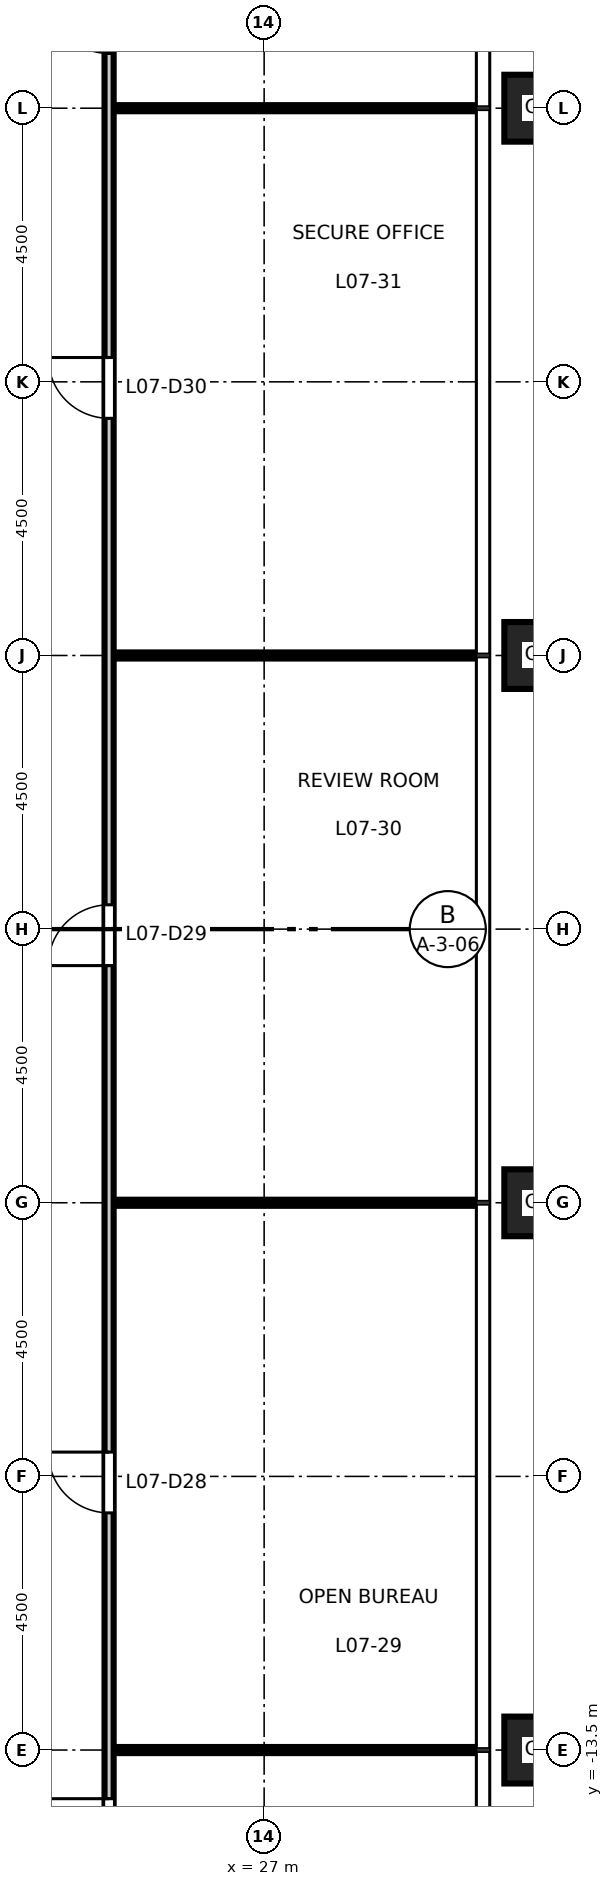
"""IFC4 building model, lengths in metres.
Left out: names, types, materials, properties, quantities, classifications, styles, units other than length and angle.
Written with IfcOpenShell. Run it as: python <this file> out.ifc"""

import sys

from ifc_helpers import new_model, si_unit, direction, frame, frame_2d, origin, origin_2d, place, context, subcontext, project, spatial, rectangle, hollow_rectangle, extrude, element, fill, save


model = new_model("IFC4")
c1 = context("Model", 3, precision=1e-05, world=origin(), true_north=direction((0.0, 1.0)))
c2 = subcontext(c1, "Body", "Model", "MODEL_VIEW")
j1 = project(units=[si_unit("LENGTHUNIT", "METRE"), si_unit("PLANEANGLEUNIT", "RADIAN")], contexts=[c1])
p1 = place(None, origin())
s1 = spatial("IfcSite", under=j1, at=p1, CompositionType="ELEMENT")
p2 = place(p1, origin())
s2 = spatial("IfcBuilding", under=s1, at=p2, CompositionType="ELEMENT")
p3 = place(p2, frame((0.0, 0.0, 35.7)))
s3 = spatial("IfcBuildingStorey", under=s2, at=p3, CompositionType="ELEMENT", Elevation=35.7)
for number, where, z_axis, x_axis in (
    (1, (31.5, -13.5, 0.0), (0.0, 0.0, 1.0), (1.0, 0.0, 0.0)),
    (2, (31.5, -4.5, 0.0), (0.0, 0.0, 1.0), (1.0, 0.0, 0.0)),
    (3, (31.5, 4.5, 0.0), (0.0, 0.0, 1.0), (1.0, 0.0, 0.0)),
    (4, (31.5, 13.5, 0.0), (0.0, 0.0, 1.0), (1.0, 0.0, 0.0)),
):
    element("IfcColumn", number, at=place(p3, frame(where, z_axis=z_axis, x_axis=x_axis)), inside=s3, PredefinedType="COLUMN", context=c2, shape_type="SweptSolid", body=[
        extrude(hollow_rectangle(XDim=1.1, YDim=1.1, WallThickness=0.07, at=origin_2d()), origin(), (0.0, 0.0, 1.0), 4.5),
    ])
p4 = place(p3, frame((24.525, -13.5, 0.0), z_axis=(0.0, 0.0, 1.0), x_axis=(1.0, 0.0, 0.0)))
e5 = element("IfcWall", 5, at=p4, inside=s3, PredefinedType="PARTITIONING", context=c2, shape_type="SweptSolid", body=[
    extrude(rectangle(XDim=5.985, YDim=0.1, at=frame_2d((2.993, 0.0))), origin(), (0.0, 0.0, 1.0), 3.35),
])
for number, where, z_axis, x_axis in (
    (6, (24.525, -4.5, 0.0), (0.0, 0.0, 1.0), (1.0, 0.0, 0.0)),
    (7, (24.525, 4.5, 0.0), (0.0, 0.0, 1.0), (1.0, 0.0, 0.0)),
):
    element("IfcWall", number, at=place(p3, frame(where, z_axis=z_axis, x_axis=x_axis)), inside=s3, PredefinedType="PARTITIONING", context=c2, shape_type="SweptSolid", body=[
        extrude(rectangle(XDim=5.985, YDim=0.1, at=frame_2d((2.993, 0.0))), origin(), (0.0, 0.0, 1.0), 4.35),
    ])
p5 = place(p3, frame((24.525, 13.5, 0.0), z_axis=(0.0, 0.0, 1.0), x_axis=(1.0, 0.0, 0.0)))
e8 = element("IfcWall", 8, at=p5, inside=s3, PredefinedType="PARTITIONING", context=c2, shape_type="SweptSolid", body=[
    extrude(rectangle(XDim=5.985, YDim=0.1, at=frame_2d((2.993, 0.0))), origin(), (0.0, 0.0, 1.0), 3.35),
])
p6 = place(p3, frame((24.45, -16.125, 0.0), z_axis=(0.0, 0.0, 1.0), x_axis=(0.0, 1.0, 0.0)))
e9 = element("IfcWall", 9, at=p6, inside=s3, PredefinedType="PARTITIONING", context=c2, shape_type="SweptSolid", body=[
    extrude(rectangle(XDim=32.25, YDim=0.15, at=frame_2d((16.125, 0.0))), origin(), (0.0, 0.0, 1.0), 4.35),
])
p7 = place(p6, frame((30.525, 0.0, 0.0)))
e10 = element("IfcOpeningElement", 10, at=p7, cuts=e9, PredefinedType="OPENING", context=c2, shape_type="SweptSolid", body=[
    extrude(rectangle(XDim=1.0, YDim=2.1, at=frame_2d((0.5, 1.05))), frame((0.0, 0.085, 0.0), z_axis=(0.0, -1.0, 0.0), x_axis=(1.0, 0.0, 0.0)), (0.0, 0.0, 1.0), 0.17),
])
p8 = place(p6, frame((0.825, 0.0, 0.0)))
e11 = element("IfcOpeningElement", 11, at=p8, cuts=e9, PredefinedType="OPENING", context=c2, shape_type="SweptSolid", body=[
    extrude(rectangle(XDim=1.0, YDim=2.1, at=frame_2d((0.5, 1.05))), frame((0.0, 0.085, 0.0), z_axis=(0.0, -1.0, 0.0), x_axis=(1.0, 0.0, 0.0)), (0.0, 0.0, 1.0), 0.17),
])
p9 = place(p6, frame((6.525, 0.0, 0.0)))
e12 = element("IfcOpeningElement", 12, at=p9, cuts=e9, PredefinedType="OPENING", context=c2, shape_type="SweptSolid", body=[
    extrude(rectangle(XDim=1.0, YDim=2.1, at=frame_2d((0.5, 1.05))), frame((0.0, 0.085, 0.0), z_axis=(0.0, -1.0, 0.0), x_axis=(1.0, 0.0, 0.0)), (0.0, 0.0, 1.0), 0.17),
])
p10 = place(p6, frame((15.525, 0.0, 0.0)))
e13 = element("IfcOpeningElement", 13, at=p10, cuts=e9, PredefinedType="OPENING", context=c2, shape_type="SweptSolid", body=[
    extrude(rectangle(XDim=1.0, YDim=2.1, at=frame_2d((0.5, 1.05))), frame((0.0, 0.085, 0.0), z_axis=(0.0, -1.0, 0.0), x_axis=(1.0, 0.0, 0.0)), (0.0, 0.0, 1.0), 0.17),
])
p11 = place(p6, frame((24.525, 0.0, 0.0)))
e14 = element("IfcOpeningElement", 14, at=p11, cuts=e9, PredefinedType="OPENING", context=c2, shape_type="SweptSolid", body=[
    extrude(rectangle(XDim=1.0, YDim=2.1, at=frame_2d((0.5, 1.05))), frame((0.0, 0.085, 0.0), z_axis=(0.0, -1.0, 0.0), x_axis=(1.0, 0.0, 0.0)), (0.0, 0.0, 1.0), 0.17),
])
p12 = place(p7, origin())
e15 = element("IfcDoor", 15, at=p12, inside=s3, OperationType="SINGLE_SWING_RIGHT", PredefinedType="DOOR", context=c2, shape_type="SweptSolid", body=[
    extrude(rectangle(XDim=1.0, YDim=2.1, at=frame_2d((0.5, 1.05))), frame((0.0, 0.025, 0.0), z_axis=(0.0, -1.0, 0.0), x_axis=(1.0, 0.0, 0.0)), (0.0, 0.0, 1.0), 0.05),
])
fill(e10, e15)
p13 = place(p8, origin())
e16 = element("IfcDoor", 16, at=p13, inside=s3, OperationType="SINGLE_SWING_RIGHT", PredefinedType="DOOR", context=c2, shape_type="SweptSolid", body=[
    extrude(rectangle(XDim=1.0, YDim=2.1, at=frame_2d((0.5, 1.05))), frame((0.0, 0.025, 0.0), z_axis=(0.0, -1.0, 0.0), x_axis=(1.0, 0.0, 0.0)), (0.0, 0.0, 1.0), 0.05),
])
fill(e11, e16)
p14 = place(p9, origin())
e17 = element("IfcDoor", 17, at=p14, inside=s3, OperationType="SINGLE_SWING_RIGHT", PredefinedType="DOOR", context=c2, shape_type="SweptSolid", body=[
    extrude(rectangle(XDim=1.0, YDim=2.1, at=frame_2d((0.5, 1.05))), frame((0.0, 0.025, 0.0), z_axis=(0.0, -1.0, 0.0), x_axis=(1.0, 0.0, 0.0)), (0.0, 0.0, 1.0), 0.05),
])
fill(e12, e17)
p15 = place(p10, origin())
e18 = element("IfcDoor", 18, at=p15, inside=s3, OperationType="SINGLE_SWING_LEFT", PredefinedType="DOOR", context=c2, shape_type="SweptSolid", body=[
    extrude(rectangle(XDim=1.0, YDim=2.1, at=frame_2d((0.5, 1.05))), frame((0.0, 0.025, 0.0), z_axis=(0.0, -1.0, 0.0), x_axis=(1.0, 0.0, 0.0)), (0.0, 0.0, 1.0), 0.05),
])
fill(e13, e18)
p16 = place(p11, origin())
e19 = element("IfcDoor", 19, at=p16, inside=s3, OperationType="SINGLE_SWING_RIGHT", PredefinedType="DOOR", context=c2, shape_type="SweptSolid", body=[
    extrude(rectangle(XDim=1.0, YDim=2.1, at=frame_2d((0.5, 1.05))), frame((0.0, 0.025, 0.0), z_axis=(0.0, -1.0, 0.0), x_axis=(1.0, 0.0, 0.0)), (0.0, 0.0, 1.0), 0.05),
])
fill(e14, e19)
save(model, sys.argv[1])
